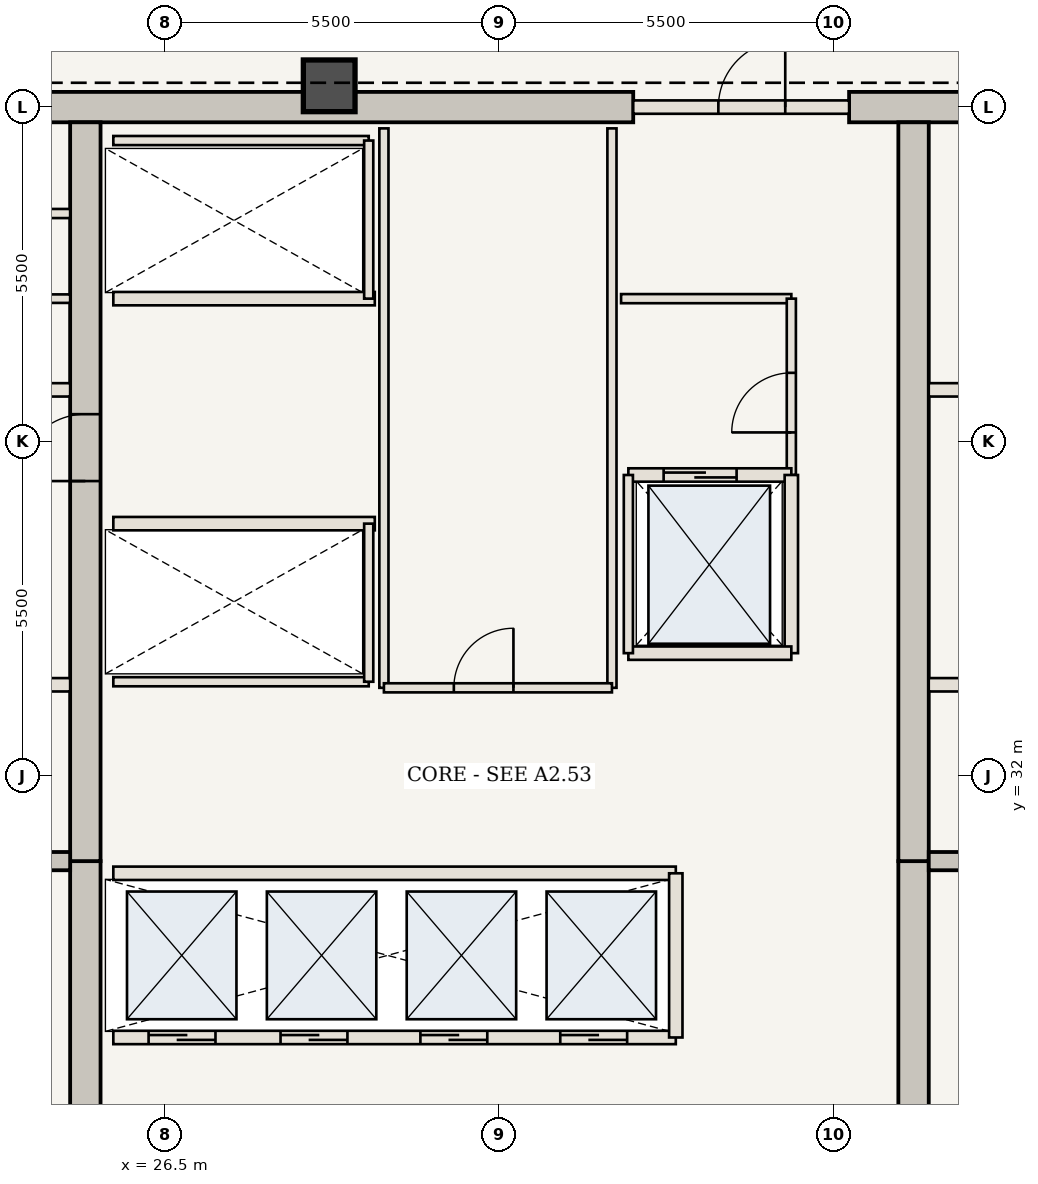
"""IFC4 building model, lengths in metres.
Left out: names, types, materials, properties, quantities, classifications, styles, units other than length and angle.
Written with IfcOpenShell. Run it as: python <this file> out.ifc"""

import sys

from ifc_helpers import new_model, si_unit, direction, frame, frame_2d, origin, origin_2d, place, context, subcontext, project, spatial, rectangle, extrude, element, fill, save


model = new_model("IFC4")
c1 = context("Model", 3, precision=1e-05, world=origin(), true_north=direction((0.0, 1.0)))
c2 = subcontext(c1, "Body", "Model", "MODEL_VIEW")
j1 = project(units=[si_unit("LENGTHUNIT", "METRE"), si_unit("PLANEANGLEUNIT", "RADIAN")], contexts=[c1])
p1 = place(None, origin())
s1 = spatial("IfcSite", under=j1, at=p1, CompositionType="ELEMENT")
p2 = place(p1, origin())
s2 = spatial("IfcBuilding", under=s1, at=p2, CompositionType="ELEMENT")
p3 = place(p2, frame((0.0, 0.0, 240.8)))
s3 = spatial("IfcBuildingStorey", under=s2, at=p3, CompositionType="ELEMENT", Elevation=240.8)
p4 = place(p3, frame((21.41, 43.0, 0.0), z_axis=(0.0, 0.0, 1.0), x_axis=(1.0, 0.0, 0.0)))
e1 = element("IfcWall", 1, at=p4, inside=s3, PredefinedType="SHEAR", context=c2, shape_type="SweptSolid", body=[
    extrude(rectangle(XDim=12.79, YDim=0.5, at=frame_2d((6.395, 0.0))), origin(), (0.0, 0.0, 1.0), 3.85),
])
p5 = place(p3, frame((37.75, 43.0, 0.0), z_axis=(0.0, 0.0, 1.0), x_axis=(1.0, 0.0, 0.0)))
e2 = element("IfcWall", 2, at=p5, inside=s3, PredefinedType="SHEAR", context=c2, shape_type="SweptSolid", body=[
    extrude(rectangle(XDim=4.84, YDim=0.5, at=frame_2d((2.42, 0.0))), origin(), (0.0, 0.0, 1.0), 3.85),
])
p6 = place(p3, frame((25.19, 21.2, 0.0), z_axis=(0.0, 0.0, 1.0), x_axis=(0.0, 1.0, 0.0)))
e3 = element("IfcWall", 3, at=p6, inside=s3, PredefinedType="SHEAR", context=c2, shape_type="SweptSolid", body=[
    extrude(rectangle(XDim=9.4, YDim=0.5, at=frame_2d((4.7, 0.0))), origin(), (0.0, 0.0, 1.0), 3.85),
])
p7 = place(p3, frame((25.19, 30.6, 0.0), z_axis=(0.0, 0.0, 1.0), x_axis=(0.0, 1.0, 0.0)))
e4 = element("IfcWall", 4, at=p7, inside=s3, PredefinedType="SHEAR", context=c2, shape_type="SweptSolid", body=[
    extrude(rectangle(XDim=12.15, YDim=0.5, at=frame_2d((6.075, 0.0))), origin(), (0.0, 0.0, 1.0), 3.85),
])
p8 = place(p7, frame((6.25, 0.0, 0.0)))
e5 = element("IfcOpeningElement", 5, at=p8, cuts=e4, PredefinedType="OPENING", context=c2, shape_type="SweptSolid", body=[
    extrude(rectangle(XDim=1.1, YDim=2.15, at=frame_2d((0.55, 1.075))), frame((0.0, 0.26, 0.0), z_axis=(0.0, -1.0, 0.0), x_axis=(1.0, 0.0, 0.0)), (0.0, 0.0, 1.0), 0.52),
])
p9 = place(p3, frame((38.81, 21.2, 0.0), z_axis=(0.0, 0.0, 1.0), x_axis=(0.0, 1.0, 0.0)))
e6 = element("IfcWall", 6, at=p9, inside=s3, PredefinedType="SHEAR", context=c2, shape_type="SweptSolid", body=[
    extrude(rectangle(XDim=9.4, YDim=0.5, at=frame_2d((4.7, 0.0))), origin(), (0.0, 0.0, 1.0), 3.85),
])
p10 = place(p3, frame((38.81, 30.6, 0.0), z_axis=(0.0, 0.0, 1.0), x_axis=(0.0, 1.0, 0.0)))
e7 = element("IfcWall", 7, at=p10, inside=s3, PredefinedType="SHEAR", context=c2, shape_type="SweptSolid", body=[
    extrude(rectangle(XDim=12.15, YDim=0.5, at=frame_2d((6.075, 0.0))), origin(), (0.0, 0.0, 1.0), 3.85),
])
p11 = place(p3, frame((29.2, 43.35, 0.0), z_axis=(0.0, 0.0, 1.0), x_axis=(1.0, 0.0, 0.0)))
e8 = element("IfcColumn", 8, at=p11, inside=s3, PredefinedType="COLUMN", context=c2, shape_type="SweptSolid", body=[
    extrude(rectangle(XDim=0.85, YDim=0.85, at=origin_2d()), origin(), (0.0, 0.0, 1.0), 3.85),
])
for number, where, z_axis, x_axis in (
    (9, (21.41, 30.6, 0.0), (0.0, 0.0, 1.0), (1.0, 0.0, 0.0)),
    (10, (39.06, 30.6, 0.0), (0.0, 0.0, 1.0), (1.0, 0.0, 0.0)),
):
    element("IfcWall", number, at=place(p3, frame(where, z_axis=z_axis, x_axis=x_axis)), inside=s3, PredefinedType="SHEAR", context=c2, shape_type="SweptSolid", body=[
        extrude(rectangle(XDim=3.53, YDim=0.3, at=frame_2d((1.765, 0.0))), origin(), (0.0, 0.0, 1.0), 3.685),
    ])
p12 = place(p3, frame((21.41, 33.5, 0.0), z_axis=(0.0, 0.0, 1.0), x_axis=(1.0, 0.0, 0.0)))
e11 = element("IfcWall", 11, at=p12, inside=s3, PredefinedType="STANDARD", context=c2, shape_type="SweptSolid", body=[
    extrude(rectangle(XDim=3.53, YDim=0.22, at=frame_2d((1.765, 0.0))), origin(), (0.0, 0.0, 1.0), 3.685),
])
p13 = place(p12, frame((0.75, 0.0, 0.0)))
e12 = element("IfcOpeningElement", 12, at=p13, cuts=e11, PredefinedType="OPENING", context=c2, shape_type="SweptSolid", body=[
    extrude(rectangle(XDim=1.2, YDim=2.2, at=frame_2d((0.6, 1.1))), frame((0.0, 0.12, 0.0), z_axis=(0.0, -1.0, 0.0), x_axis=(1.0, 0.0, 0.0)), (0.0, 0.0, 1.0), 0.24),
])
p14 = place(p3, frame((39.06, 33.5, 0.0), z_axis=(0.0, 0.0, 1.0), x_axis=(1.0, 0.0, 0.0)))
e13 = element("IfcWall", 13, at=p14, inside=s3, PredefinedType="STANDARD", context=c2, shape_type="SweptSolid", body=[
    extrude(rectangle(XDim=3.53, YDim=0.22, at=frame_2d((1.765, 0.0))), origin(), (0.0, 0.0, 1.0), 3.685),
])
p15 = place(p14, frame((1.55, 0.0, 0.0)))
e14 = element("IfcOpeningElement", 14, at=p15, cuts=e13, PredefinedType="OPENING", context=c2, shape_type="SweptSolid", body=[
    extrude(rectangle(XDim=1.2, YDim=2.2, at=frame_2d((0.6, 1.1))), frame((0.0, 0.12, 0.0), z_axis=(0.0, -1.0, 0.0), x_axis=(1.0, 0.0, 0.0)), (0.0, 0.0, 1.0), 0.24),
])
for number, where, z_axis, x_axis in (
    (15, (21.41, 38.35, 0.0), (0.0, 0.0, 1.0), (1.0, 0.0, 0.0)),
    (16, (39.06, 38.35, 0.0), (0.0, 0.0, 1.0), (1.0, 0.0, 0.0)),
):
    element("IfcWall", number, at=place(p3, frame(where, z_axis=z_axis, x_axis=x_axis)), inside=s3, PredefinedType="STANDARD", context=c2, shape_type="SweptSolid", body=[
        extrude(rectangle(XDim=3.53, YDim=0.22, at=frame_2d((1.765, 0.0))), origin(), (0.0, 0.0, 1.0), 3.685),
    ])
p16 = place(p3, frame((21.41, 39.85, 0.0), z_axis=(0.0, 0.0, 1.0), x_axis=(1.0, 0.0, 0.0)))
e17 = element("IfcWall", 17, at=p16, inside=s3, PredefinedType="STANDARD", context=c2, shape_type="SweptSolid", body=[
    extrude(rectangle(XDim=3.53, YDim=0.14, at=frame_2d((1.765, 0.0))), origin(), (0.0, 0.0, 1.0), 3.685),
])
p17 = place(p3, frame((21.41, 41.25, 0.0), z_axis=(0.0, 0.0, 1.0), x_axis=(1.0, 0.0, 0.0)))
e18 = element("IfcWall", 18, at=p17, inside=s3, PredefinedType="STANDARD", context=c2, shape_type="SweptSolid", body=[
    extrude(rectangle(XDim=3.53, YDim=0.15, at=frame_2d((1.765, 0.0))), origin(), (0.0, 0.0, 1.0), 3.685),
])
p18 = place(p3, frame((34.0, 39.85, 0.0), z_axis=(0.0, 0.0, 1.0), x_axis=(1.0, 0.0, 0.0)))
e19 = element("IfcWall", 19, at=p18, inside=s3, PredefinedType="STANDARD", context=c2, shape_type="SweptSolid", body=[
    extrude(rectangle(XDim=2.8, YDim=0.15, at=frame_2d((1.4, 0.0))), origin(), (0.0, 0.0, 1.0), 3.685),
])
p19 = place(p3, frame((36.8, 36.95, 0.0), z_axis=(0.0, 0.0, 1.0), x_axis=(0.0, 1.0, 0.0)))
e20 = element("IfcWall", 20, at=p19, inside=s3, PredefinedType="STANDARD", context=c2, shape_type="SweptSolid", body=[
    extrude(rectangle(XDim=2.9, YDim=0.15, at=frame_2d((1.45, 0.0))), origin(), (0.0, 0.0, 1.0), 3.685),
])
p20 = place(p19, frame((0.7, 0.0, 0.0)))
e21 = element("IfcOpeningElement", 21, at=p20, cuts=e20, PredefinedType="OPENING", context=c2, shape_type="SweptSolid", body=[
    extrude(rectangle(XDim=0.98, YDim=2.2, at=frame_2d((0.49, 1.1))), frame((0.0, 0.085, 0.0), z_axis=(0.0, -1.0, 0.0), x_axis=(1.0, 0.0, 0.0)), (0.0, 0.0, 1.0), 0.17),
])
p21 = place(p3, frame((25.65, 27.7, 0.0), z_axis=(0.0, 0.0, 1.0), x_axis=(1.0, 0.0, 0.0)))
e22 = element("IfcWall", 22, at=p21, inside=s3, PredefinedType="STANDARD", context=c2, shape_type="SweptSolid", body=[
    extrude(rectangle(XDim=9.25, YDim=0.22, at=frame_2d((4.625, 0.0))), origin(), (0.0, 0.0, 1.0), 3.685),
])
p22 = place(p21, frame((0.58, 0.0, 0.0)))
e23 = element("IfcOpeningElement", 23, at=p22, cuts=e22, PredefinedType="OPENING", context=c2, shape_type="SweptSolid", body=[
    extrude(rectangle(XDim=1.1, YDim=2.15, at=frame_2d((0.55, 1.075))), frame((0.0, 0.12, 0.0), z_axis=(0.0, -1.0, 0.0), x_axis=(1.0, 0.0, 0.0)), (0.0, 0.0, 1.0), 0.24),
])
p23 = place(p21, frame((2.75, 0.0, 0.0)))
e24 = element("IfcOpeningElement", 24, at=p23, cuts=e22, PredefinedType="OPENING", context=c2, shape_type="SweptSolid", body=[
    extrude(rectangle(XDim=1.1, YDim=2.15, at=frame_2d((0.55, 1.075))), frame((0.0, 0.12, 0.0), z_axis=(0.0, -1.0, 0.0), x_axis=(1.0, 0.0, 0.0)), (0.0, 0.0, 1.0), 0.24),
])
p24 = place(p21, frame((5.05, 0.0, 0.0)))
e25 = element("IfcOpeningElement", 25, at=p24, cuts=e22, PredefinedType="OPENING", context=c2, shape_type="SweptSolid", body=[
    extrude(rectangle(XDim=1.1, YDim=2.15, at=frame_2d((0.55, 1.075))), frame((0.0, 0.12, 0.0), z_axis=(0.0, -1.0, 0.0), x_axis=(1.0, 0.0, 0.0)), (0.0, 0.0, 1.0), 0.24),
])
p25 = place(p21, frame((7.35, 0.0, 0.0)))
e26 = element("IfcOpeningElement", 26, at=p25, cuts=e22, PredefinedType="OPENING", context=c2, shape_type="SweptSolid", body=[
    extrude(rectangle(XDim=1.1, YDim=2.15, at=frame_2d((0.55, 1.075))), frame((0.0, 0.12, 0.0), z_axis=(0.0, -1.0, 0.0), x_axis=(1.0, 0.0, 0.0)), (0.0, 0.0, 1.0), 0.24),
])
p26 = place(p3, frame((25.65, 30.4, 0.0), z_axis=(0.0, 0.0, 1.0), x_axis=(1.0, 0.0, 0.0)))
e27 = element("IfcWall", 27, at=p26, inside=s3, PredefinedType="STANDARD", context=c2, shape_type="SweptSolid", body=[
    extrude(rectangle(XDim=9.25, YDim=0.22, at=frame_2d((4.625, 0.0))), origin(), (0.0, 0.0, 1.0), 3.685),
])
p27 = place(p3, frame((34.9, 27.7, 0.0), z_axis=(0.0, 0.0, 1.0), x_axis=(0.0, 1.0, 0.0)))
e28 = element("IfcWall", 28, at=p27, inside=s3, PredefinedType="STANDARD", context=c2, shape_type="SweptSolid", body=[
    extrude(rectangle(XDim=2.7, YDim=0.22, at=frame_2d((1.35, 0.0))), origin(), (0.0, 0.0, 1.0), 3.685),
])
p28 = place(p3, frame((25.65, 36.15, 0.0), z_axis=(0.0, 0.0, 1.0), x_axis=(1.0, 0.0, 0.0)))
e29 = element("IfcWall", 29, at=p28, inside=s3, PredefinedType="STANDARD", context=c2, shape_type="SweptSolid", body=[
    extrude(rectangle(XDim=4.3, YDim=0.22, at=frame_2d((2.15, 0.0))), origin(), (0.0, 0.0, 1.0), 3.685),
])
p29 = place(p3, frame((25.65, 33.55, 0.0), z_axis=(0.0, 0.0, 1.0), x_axis=(1.0, 0.0, 0.0)))
e30 = element("IfcWall", 30, at=p29, inside=s3, PredefinedType="STANDARD", context=c2, shape_type="SweptSolid", body=[
    extrude(rectangle(XDim=4.2, YDim=0.15, at=frame_2d((2.1, 0.0))), origin(), (0.0, 0.0, 1.0), 3.685),
])
p30 = place(p3, frame((29.85, 33.55, 0.0), z_axis=(0.0, 0.0, 1.0), x_axis=(0.0, 1.0, 0.0)))
e31 = element("IfcWall", 31, at=p30, inside=s3, PredefinedType="STANDARD", context=c2, shape_type="SweptSolid", body=[
    extrude(rectangle(XDim=2.6, YDim=0.15, at=frame_2d((1.3, 0.0))), origin(), (0.0, 0.0, 1.0), 3.685),
])
p31 = place(p3, frame((25.65, 39.85, 0.0), z_axis=(0.0, 0.0, 1.0), x_axis=(1.0, 0.0, 0.0)))
e32 = element("IfcWall", 32, at=p31, inside=s3, PredefinedType="STANDARD", context=c2, shape_type="SweptSolid", body=[
    extrude(rectangle(XDim=4.3, YDim=0.22, at=frame_2d((2.15, 0.0))), origin(), (0.0, 0.0, 1.0), 3.685),
])
p32 = place(p3, frame((25.65, 42.45, 0.0), z_axis=(0.0, 0.0, 1.0), x_axis=(1.0, 0.0, 0.0)))
e33 = element("IfcWall", 33, at=p32, inside=s3, PredefinedType="STANDARD", context=c2, shape_type="SweptSolid", body=[
    extrude(rectangle(XDim=4.2, YDim=0.15, at=frame_2d((2.1, 0.0))), origin(), (0.0, 0.0, 1.0), 3.685),
])
p33 = place(p3, frame((29.85, 39.85, 0.0), z_axis=(0.0, 0.0, 1.0), x_axis=(0.0, 1.0, 0.0)))
e34 = element("IfcWall", 34, at=p33, inside=s3, PredefinedType="STANDARD", context=c2, shape_type="SweptSolid", body=[
    extrude(rectangle(XDim=2.6, YDim=0.15, at=frame_2d((1.3, 0.0))), origin(), (0.0, 0.0, 1.0), 3.685),
])
for number, where, z_axis, x_axis in (
    (35, (30.1, 33.45, 0.0), (0.0, 0.0, 1.0), (0.0, 1.0, 0.0)),
    (36, (33.85, 33.45, 0.0), (0.0, 0.0, 1.0), (0.0, 1.0, 0.0)),
):
    element("IfcWall", number, at=place(p3, frame(where, z_axis=z_axis, x_axis=x_axis)), inside=s3, PredefinedType="STANDARD", context=c2, shape_type="SweptSolid", body=[
        extrude(rectangle(XDim=9.2, YDim=0.15, at=frame_2d((4.6, 0.0))), origin(), (0.0, 0.0, 1.0), 3.685),
    ])
p34 = place(p3, frame((30.1, 33.45, 0.0), z_axis=(0.0, 0.0, 1.0), x_axis=(1.0, 0.0, 0.0)))
e37 = element("IfcWall", 37, at=p34, inside=s3, PredefinedType="STANDARD", context=c2, shape_type="SweptSolid", body=[
    extrude(rectangle(XDim=3.75, YDim=0.15, at=frame_2d((1.875, 0.0))), origin(), (0.0, 0.0, 1.0), 3.685),
])
p35 = place(p34, frame((1.15, 0.0, 0.0)))
e38 = element("IfcOpeningElement", 38, at=p35, cuts=e37, PredefinedType="OPENING", context=c2, shape_type="SweptSolid", body=[
    extrude(rectangle(XDim=0.98, YDim=2.2, at=frame_2d((0.49, 1.1))), frame((0.0, 0.085, 0.0), z_axis=(0.0, -1.0, 0.0), x_axis=(1.0, 0.0, 0.0)), (0.0, 0.0, 1.0), 0.17),
])
p36 = place(p3, frame((34.2, 43.0, 0.0), z_axis=(0.0, 0.0, 1.0), x_axis=(1.0, 0.0, 0.0)))
e39 = element("IfcWall", 39, at=p36, inside=s3, PredefinedType="STANDARD", context=c2, shape_type="SweptSolid", body=[
    extrude(rectangle(XDim=3.55, YDim=0.22, at=frame_2d((1.775, 0.0))), origin(), (0.0, 0.0, 1.0), 3.685),
])
p37 = place(p36, frame((1.4, 0.0, 0.0)))
e40 = element("IfcOpeningElement", 40, at=p37, cuts=e39, PredefinedType="OPENING", context=c2, shape_type="SweptSolid", body=[
    extrude(rectangle(XDim=1.1, YDim=2.15, at=frame_2d((0.55, 1.075))), frame((0.0, 0.12, 0.0), z_axis=(0.0, -1.0, 0.0), x_axis=(1.0, 0.0, 0.0)), (0.0, 0.0, 1.0), 0.24),
])
p38 = place(p3, frame((34.12, 36.95, 0.0), z_axis=(0.0, 0.0, 1.0), x_axis=(1.0, 0.0, 0.0)))
e41 = element("IfcWall", 41, at=p38, inside=s3, PredefinedType="STANDARD", context=c2, shape_type="SweptSolid", body=[
    extrude(rectangle(XDim=2.68, YDim=0.22, at=frame_2d((1.34, 0.0))), origin(), (0.0, 0.0, 1.0), 3.685),
])
p39 = place(p38, frame((0.58, 0.0, 0.0)))
e42 = element("IfcOpeningElement", 42, at=p39, cuts=e41, PredefinedType="OPENING", context=c2, shape_type="SweptSolid", body=[
    extrude(rectangle(XDim=1.2, YDim=2.2, at=frame_2d((0.6, 1.1))), frame((0.0, 0.12, 0.0), z_axis=(0.0, -1.0, 0.0), x_axis=(1.0, 0.0, 0.0)), (0.0, 0.0, 1.0), 0.24),
])
p40 = place(p3, frame((36.8, 34.02, 0.0), z_axis=(0.0, 0.0, 1.0), x_axis=(0.0, 1.0, 0.0)))
e43 = element("IfcWall", 43, at=p40, inside=s3, PredefinedType="STANDARD", context=c2, shape_type="SweptSolid", body=[
    extrude(rectangle(XDim=2.93, YDim=0.22, at=frame_2d((1.465, 0.0))), origin(), (0.0, 0.0, 1.0), 3.685),
])
p41 = place(p3, frame((34.12, 34.02, 0.0), z_axis=(0.0, 0.0, 1.0), x_axis=(1.0, 0.0, 0.0)))
e44 = element("IfcWall", 44, at=p41, inside=s3, PredefinedType="STANDARD", context=c2, shape_type="SweptSolid", body=[
    extrude(rectangle(XDim=2.68, YDim=0.22, at=frame_2d((1.34, 0.0))), origin(), (0.0, 0.0, 1.0), 3.685),
])
p42 = place(p3, frame((34.12, 34.02, 0.0), z_axis=(0.0, 0.0, 1.0), x_axis=(0.0, 1.0, 0.0)))
e45 = element("IfcWall", 45, at=p42, inside=s3, PredefinedType="STANDARD", context=c2, shape_type="SweptSolid", body=[
    extrude(rectangle(XDim=2.93, YDim=0.15, at=frame_2d((1.465, 0.0))), origin(), (0.0, 0.0, 1.0), 3.685),
])
p43 = place(p8, origin())
e46 = element("IfcDoor", 46, at=p43, inside=s3, OperationType="SINGLE_SWING_LEFT", PredefinedType="DOOR", context=c2, shape_type="SweptSolid", body=[
    extrude(rectangle(XDim=1.1, YDim=2.15, at=frame_2d((0.55, 1.075))), frame((0.0, 0.025, 0.0), z_axis=(0.0, -1.0, 0.0), x_axis=(1.0, 0.0, 0.0)), (0.0, 0.0, 1.0), 0.05),
])
fill(e5, e46)
p44 = place(p20, origin())
e47 = element("IfcDoor", 47, at=p44, inside=s3, OperationType="SINGLE_SWING_LEFT", PredefinedType="DOOR", context=c2, shape_type="SweptSolid", body=[
    extrude(rectangle(XDim=0.98, YDim=2.2, at=frame_2d((0.49, 1.1))), frame((0.0, 0.025, 0.0), z_axis=(0.0, -1.0, 0.0), x_axis=(1.0, 0.0, 0.0)), (0.0, 0.0, 1.0), 0.05),
])
fill(e21, e47)
p45 = place(p22, origin())
e48 = element("IfcDoor", 48, at=p45, inside=s3, OperationType="DOUBLE_DOOR_SLIDING", PredefinedType="DOOR", context=c2, shape_type="SweptSolid", body=[
    extrude(rectangle(XDim=1.1, YDim=2.15, at=frame_2d((0.55, 1.075))), frame((0.0, 0.025, 0.0), z_axis=(0.0, -1.0, 0.0), x_axis=(1.0, 0.0, 0.0)), (0.0, 0.0, 1.0), 0.05),
])
fill(e23, e48)
p46 = place(p23, origin())
e49 = element("IfcDoor", 49, at=p46, inside=s3, OperationType="DOUBLE_DOOR_SLIDING", PredefinedType="DOOR", context=c2, shape_type="SweptSolid", body=[
    extrude(rectangle(XDim=1.1, YDim=2.15, at=frame_2d((0.55, 1.075))), frame((0.0, 0.025, 0.0), z_axis=(0.0, -1.0, 0.0), x_axis=(1.0, 0.0, 0.0)), (0.0, 0.0, 1.0), 0.05),
])
fill(e24, e49)
p47 = place(p24, origin())
e50 = element("IfcDoor", 50, at=p47, inside=s3, OperationType="DOUBLE_DOOR_SLIDING", PredefinedType="DOOR", context=c2, shape_type="SweptSolid", body=[
    extrude(rectangle(XDim=1.1, YDim=2.15, at=frame_2d((0.55, 1.075))), frame((0.0, 0.025, 0.0), z_axis=(0.0, -1.0, 0.0), x_axis=(1.0, 0.0, 0.0)), (0.0, 0.0, 1.0), 0.05),
])
fill(e25, e50)
p48 = place(p25, origin())
e51 = element("IfcDoor", 51, at=p48, inside=s3, OperationType="DOUBLE_DOOR_SLIDING", PredefinedType="DOOR", context=c2, shape_type="SweptSolid", body=[
    extrude(rectangle(XDim=1.1, YDim=2.15, at=frame_2d((0.55, 1.075))), frame((0.0, 0.025, 0.0), z_axis=(0.0, -1.0, 0.0), x_axis=(1.0, 0.0, 0.0)), (0.0, 0.0, 1.0), 0.05),
])
fill(e26, e51)
p49 = place(p35, origin())
e52 = element("IfcDoor", 52, at=p49, inside=s3, OperationType="SINGLE_SWING_RIGHT", PredefinedType="DOOR", context=c2, shape_type="SweptSolid", body=[
    extrude(rectangle(XDim=0.98, YDim=2.2, at=frame_2d((0.49, 1.1))), frame((0.0, 0.025, 0.0), z_axis=(0.0, -1.0, 0.0), x_axis=(1.0, 0.0, 0.0)), (0.0, 0.0, 1.0), 0.05),
])
fill(e38, e52)
p50 = place(p37, origin())
e53 = element("IfcDoor", 53, at=p50, inside=s3, OperationType="SINGLE_SWING_RIGHT", PredefinedType="DOOR", context=c2, shape_type="SweptSolid", body=[
    extrude(rectangle(XDim=1.1, YDim=2.15, at=frame_2d((0.55, 1.075))), frame((0.0, 0.025, 0.0), z_axis=(0.0, -1.0, 0.0), x_axis=(1.0, 0.0, 0.0)), (0.0, 0.0, 1.0), 0.05),
])
fill(e40, e53)
p51 = place(p39, origin())
e54 = element("IfcDoor", 54, at=p51, inside=s3, OperationType="DOUBLE_DOOR_SLIDING", PredefinedType="DOOR", context=c2, shape_type="SweptSolid", body=[
    extrude(rectangle(XDim=1.2, YDim=2.2, at=frame_2d((0.6, 1.1))), frame((0.0, 0.025, 0.0), z_axis=(0.0, -1.0, 0.0), x_axis=(1.0, 0.0, 0.0)), (0.0, 0.0, 1.0), 0.05),
])
fill(e42, e54)
save(model, sys.argv[1])
